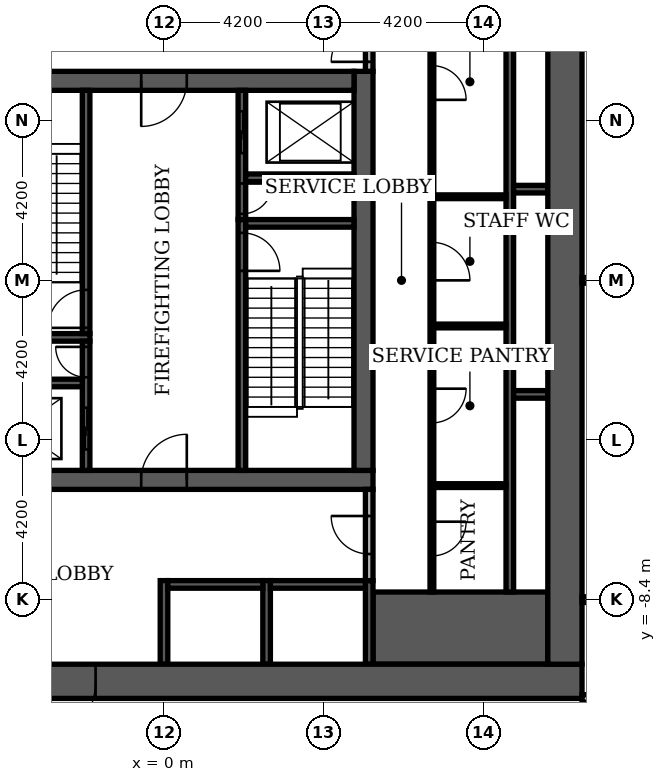
"""IFC4 building model, lengths in metres.
Left out: names, types, materials, properties, quantities, classifications, styles, units other than length and angle.
Written with IfcOpenShell. Run it as: python <this file> out.ifc"""

import sys

from ifc_helpers import new_model, si_unit, direction, frame, frame_2d, origin, place, context, subcontext, project, spatial, rectangle, extrude, element, fill, save


model = new_model("IFC4")
c1 = context("Model", 3, precision=1e-05, world=origin(), true_north=direction((0.0, 1.0)))
c2 = subcontext(c1, "Body", "Model", "MODEL_VIEW")
j1 = project(units=[si_unit("LENGTHUNIT", "METRE"), si_unit("PLANEANGLEUNIT", "RADIAN")], contexts=[c1])
p1 = place(None, origin())
s1 = spatial("IfcSite", under=j1, at=p1, CompositionType="ELEMENT")
p2 = place(p1, origin())
s2 = spatial("IfcBuilding", under=s1, at=p2, CompositionType="ELEMENT")
p3 = place(p2, frame((0.0, 0.0, 7.2)))
s3 = spatial("IfcBuildingStorey", under=s2, at=p3, CompositionType="ELEMENT", Elevation=7.2)
p4 = place(p3, frame((-5.5, -5.25, 0.0), z_axis=(0.0, 0.0, 1.0), x_axis=(1.0, 0.0, 0.0)))
e1 = element("IfcWall", 1, at=p4, inside=s3, PredefinedType="SHEAR", context=c2, shape_type="SweptSolid", body=[
    extrude(rectangle(XDim=11.0, YDim=0.5, at=frame_2d((5.5, 0.0))), origin(), (0.0, 0.0, 1.0), 4.38),
])
p5 = place(p4, frame((4.9, 0.0, 0.0)))
e2 = element("IfcOpeningElement", 2, at=p5, cuts=e1, PredefinedType="OPENING", context=c2, shape_type="SweptSolid", body=[
    extrude(rectangle(XDim=1.2, YDim=2.1, at=frame_2d((0.6, 1.05))), frame((0.0, 0.26, 0.0), z_axis=(0.0, -1.0, 0.0), x_axis=(1.0, 0.0, 0.0)), (0.0, 0.0, 1.0), 0.52),
])
p6 = place(p3, frame((5.25, -5.0, 0.0), z_axis=(0.0, 0.0, 1.0), x_axis=(0.0, 1.0, 0.0)))
e3 = element("IfcWall", 3, at=p6, inside=s3, PredefinedType="SHEAR", context=c2, shape_type="SweptSolid", body=[
    extrude(rectangle(XDim=10.5, YDim=0.5, at=frame_2d((5.25, 0.0))), origin(), (0.0, 0.0, 1.0), 4.38),
])
p7 = place(p3, frame((-5.0, 5.25, 0.0), z_axis=(0.0, 0.0, 1.0), x_axis=(1.0, 0.0, 0.0)))
e4 = element("IfcWall", 4, at=p7, inside=s3, PredefinedType="SHEAR", context=c2, shape_type="SweptSolid", body=[
    extrude(rectangle(XDim=10.0, YDim=0.5, at=frame_2d((5.0, 0.0))), origin(), (0.0, 0.0, 1.0), 4.38),
])
p8 = place(p7, frame((4.4, 0.0, 0.0)))
e5 = element("IfcOpeningElement", 5, at=p8, cuts=e4, PredefinedType="OPENING", context=c2, shape_type="SweptSolid", body=[
    extrude(rectangle(XDim=1.2, YDim=2.1, at=frame_2d((0.6, 1.05))), frame((0.0, 0.26, 0.0), z_axis=(0.0, -1.0, 0.0), x_axis=(1.0, 0.0, 0.0)), (0.0, 0.0, 1.0), 0.52),
])
p9 = place(p3, frame((5.5, -9.15, 0.0), z_axis=(0.0, 0.0, 1.0), x_axis=(1.0, 0.0, 0.0)))
e6 = element("IfcWall", 6, at=p9, inside=s3, PredefinedType="SHEAR", context=c2, shape_type="SweptSolid", body=[
    extrude(rectangle(XDim=4.6, YDim=1.9, at=frame_2d((2.3, 0.0))), origin(), (0.0, 0.0, 1.0), 4.38),
])
p10 = place(p3, frame((2.05, -5.0, 0.0), z_axis=(0.0, 0.0, 1.0), x_axis=(0.0, 1.0, 0.0)))
e7 = element("IfcWall", 7, at=p10, inside=s3, PredefinedType="SHEAR", context=c2, shape_type="SweptSolid", body=[
    extrude(rectangle(XDim=6.6, YDim=0.2, at=frame_2d((3.3, 0.0))), origin(), (0.0, 0.0, 1.0), 4.38),
])
p11 = place(p10, frame((5.25, 0.0, 0.0)))
e8 = element("IfcOpeningElement", 8, at=p11, cuts=e7, PredefinedType="OPENING", context=c2, shape_type="SweptSolid", body=[
    extrude(rectangle(XDim=1.0, YDim=2.1, at=frame_2d((0.5, 1.05))), frame((0.0, 0.11, 0.0), z_axis=(0.0, -1.0, 0.0), x_axis=(1.0, 0.0, 0.0)), (0.0, 0.0, 1.0), 0.22),
])
p12 = place(p3, frame((-5.0, -1.5, 0.0), z_axis=(0.0, 0.0, 1.0), x_axis=(1.0, 0.0, 0.0)))
e9 = element("IfcWall", 9, at=p12, inside=s3, PredefinedType="SHEAR", context=c2, shape_type="SweptSolid", body=[
    extrude(rectangle(XDim=3.05, YDim=0.2, at=frame_2d((1.525, 0.0))), origin(), (0.0, 0.0, 1.0), 4.38),
])
p13 = place(p3, frame((-2.05, -1.4, 0.0), z_axis=(0.0, 0.0, 1.0), x_axis=(0.0, 1.0, 0.0)))
e10 = element("IfcWall", 10, at=p13, inside=s3, PredefinedType="SHEAR", context=c2, shape_type="SweptSolid", body=[
    extrude(rectangle(XDim=6.4, YDim=0.2, at=frame_2d((3.2, 0.0))), origin(), (0.0, 0.0, 1.0), 4.38),
])
p14 = place(p13, frame((0.15, 0.0, 0.0)))
e11 = element("IfcOpeningElement", 11, at=p14, cuts=e10, PredefinedType="OPENING", context=c2, shape_type="SweptSolid", body=[
    extrude(rectangle(XDim=1.0, YDim=2.1, at=frame_2d((0.5, 1.05))), frame((0.0, 0.11, 0.0), z_axis=(0.0, -1.0, 0.0), x_axis=(1.0, 0.0, 0.0)), (0.0, 0.0, 1.0), 0.22),
])
p15 = place(p3, frame((2.15, 1.5, 0.0), z_axis=(0.0, 0.0, 1.0), x_axis=(1.0, 0.0, 0.0)))
e12 = element("IfcWall", 12, at=p15, inside=s3, PredefinedType="SHEAR", context=c2, shape_type="SweptSolid", body=[
    extrude(rectangle(XDim=2.85, YDim=0.2, at=frame_2d((1.425, 0.0))), origin(), (0.0, 0.0, 1.0), 4.38),
])
for number, where, z_axis, x_axis in (
    (13, (0.0, -10.1, 0.0), (0.0, 0.0, 1.0), (0.0, 1.0, 0.0)),
    (14, (2.7, -10.1, 0.0), (0.0, 0.0, 1.0), (0.0, 1.0, 0.0)),
    (15, (5.4, -10.1, 0.0), (0.0, 0.0, 1.0), (0.0, 1.0, 0.0)),
):
    element("IfcWall", number, at=place(p3, frame(where, z_axis=z_axis, x_axis=x_axis)), inside=s3, PredefinedType="SHEAR", context=c2, shape_type="SweptSolid", body=[
        extrude(rectangle(XDim=2.2, YDim=0.2, at=frame_2d((1.1, 0.0))), origin(), (0.0, 0.0, 1.0), 4.38),
    ])
p16 = place(p3, frame((9.1, -8.2, 0.0), z_axis=(0.0, 0.0, 1.0), x_axis=(0.0, 1.0, 0.0)))
e16 = element("IfcWall", 16, at=p16, inside=s3, PredefinedType="SHEAR", context=c2, shape_type="SweptSolid", body=[
    extrude(rectangle(XDim=16.4, YDim=0.2, at=frame_2d((8.2, 0.0))), origin(), (0.0, 0.0, 1.0), 4.38),
])
for number, where, z_axis, x_axis in (
    (17, (0.1, -8.0, 0.0), (0.0, 0.0, 1.0), (1.0, 0.0, 0.0)),
    (18, (2.8, -8.0, 0.0), (0.0, 0.0, 1.0), (1.0, 0.0, 0.0)),
):
    element("IfcWall", number, at=place(p3, frame(where, z_axis=z_axis, x_axis=x_axis)), inside=s3, PredefinedType="SHEAR", context=c2, shape_type="SweptSolid", body=[
        extrude(rectangle(XDim=2.5, YDim=0.2, at=frame_2d((1.25, 0.0))), origin(), (0.0, 0.0, 1.0), 4.38),
    ])
p17 = place(p3, frame((-2.05, -5.0, 0.0), z_axis=(0.0, 0.0, 1.0), x_axis=(0.0, 1.0, 0.0)))
e19 = element("IfcWall", 19, at=p17, inside=s3, PredefinedType="SHEAR", context=c2, shape_type="SweptSolid", body=[
    extrude(rectangle(XDim=3.4, YDim=0.2, at=frame_2d((1.7, 0.0))), origin(), (0.0, 0.0, 1.0), 4.38),
])
p18 = place(p17, frame((0.55, 0.0, 0.0)))
e20 = element("IfcOpeningElement", 20, at=p18, cuts=e19, PredefinedType="OPENING", context=c2, shape_type="SweptSolid", body=[
    extrude(rectangle(XDim=1.1, YDim=2.1, at=frame_2d((0.55, 1.05))), frame((0.0, 0.11, 0.0), z_axis=(0.0, -1.0, 0.0), x_axis=(1.0, 0.0, 0.0)), (0.0, 0.0, 1.0), 0.22),
])
p19 = place(p17, frame((2.45, 0.0, 0.0)))
e21 = element("IfcOpeningElement", 21, at=p19, cuts=e19, PredefinedType="OPENING", context=c2, shape_type="SweptSolid", body=[
    extrude(rectangle(XDim=0.8, YDim=2.1, at=frame_2d((0.4, 1.05))), frame((0.0, 0.11, 0.0), z_axis=(0.0, -1.0, 0.0), x_axis=(1.0, 0.0, 0.0)), (0.0, 0.0, 1.0), 0.22),
])
p20 = place(p3, frame((9.2, -3.0, 0.0), z_axis=(0.0, 0.0, 1.0), x_axis=(1.0, 0.0, 0.0)))
e22 = element("IfcWall", 22, at=p20, inside=s3, PredefinedType="SHEAR", context=c2, shape_type="SweptSolid", body=[
    extrude(rectangle(XDim=0.9, YDim=0.2, at=frame_2d((0.45, 0.0))), origin(), (0.0, 0.0, 1.0), 4.38),
])
p21 = place(p3, frame((-5.0, -2.7, 0.0), z_axis=(0.0, 0.0, 1.0), x_axis=(1.0, 0.0, 0.0)))
e23 = element("IfcWall", 23, at=p21, inside=s3, PredefinedType="SHEAR", context=c2, shape_type="SweptSolid", body=[
    extrude(rectangle(XDim=2.85, YDim=0.2, at=frame_2d((1.425, 0.0))), origin(), (0.0, 0.0, 1.0), 4.38),
])
p22 = place(p3, frame((2.05, 1.6, 0.0), z_axis=(0.0, 0.0, 1.0), x_axis=(0.0, 1.0, 0.0)))
e24 = element("IfcWall", 24, at=p22, inside=s3, PredefinedType="SHEAR", context=c2, shape_type="SweptSolid", body=[
    extrude(rectangle(XDim=3.4, YDim=0.2, at=frame_2d((1.7, 0.0))), origin(), (0.0, 0.0, 1.0), 4.38),
])
p23 = place(p22, frame((1.75, 0.0, 0.0)))
e25 = element("IfcOpeningElement", 25, at=p23, cuts=e24, PredefinedType="OPENING", context=c2, shape_type="SweptSolid", body=[
    extrude(rectangle(XDim=1.1, YDim=2.1, at=frame_2d((0.55, 1.05))), frame((0.0, 0.11, 0.0), z_axis=(0.0, -1.0, 0.0), x_axis=(1.0, 0.0, 0.0)), (0.0, 0.0, 1.0), 0.22),
])
p24 = place(p22, frame((0.15, 0.0, 0.0)))
e26 = element("IfcOpeningElement", 26, at=p24, cuts=e24, PredefinedType="OPENING", context=c2, shape_type="SweptSolid", body=[
    extrude(rectangle(XDim=0.8, YDim=2.1, at=frame_2d((0.4, 1.05))), frame((0.0, 0.11, 0.0), z_axis=(0.0, -1.0, 0.0), x_axis=(1.0, 0.0, 0.0)), (0.0, 0.0, 1.0), 0.22),
])
p25 = place(p3, frame((9.2, 2.4, 0.0), z_axis=(0.0, 0.0, 1.0), x_axis=(1.0, 0.0, 0.0)))
e27 = element("IfcWall", 27, at=p25, inside=s3, PredefinedType="SHEAR", context=c2, shape_type="SweptSolid", body=[
    extrude(rectangle(XDim=0.9, YDim=0.2, at=frame_2d((0.45, 0.0))), origin(), (0.0, 0.0, 1.0), 4.38),
])
p26 = place(p3, frame((2.15, 2.7, 0.0), z_axis=(0.0, 0.0, 1.0), x_axis=(1.0, 0.0, 0.0)))
e28 = element("IfcWall", 28, at=p26, inside=s3, PredefinedType="SHEAR", context=c2, shape_type="SweptSolid", body=[
    extrude(rectangle(XDim=2.85, YDim=0.2, at=frame_2d((1.425, 0.0))), origin(), (0.0, 0.0, 1.0), 4.38),
])
p27 = place(p3, frame((-11.0, -10.55, 0.0), z_axis=(0.0, 0.0, 1.0), x_axis=(1.0, 0.0, 0.0)))
e29 = element("IfcWall", 29, at=p27, inside=s3, PredefinedType="SHEAR", context=c2, shape_type="SweptSolid", body=[
    extrude(rectangle(XDim=22.0, YDim=0.9, at=frame_2d((11.0, 0.0))), origin(), (0.0, 0.0, 1.0), 4.38),
])
p28 = place(p27, frame((7.4, 0.0, 0.0)))
e30 = element("IfcOpeningElement", 30, at=p28, cuts=e29, PredefinedType="OPENING", context=c2, shape_type="SweptSolid", body=[
    extrude(rectangle(XDim=1.8, YDim=2.2, at=frame_2d((0.9, 1.1))), frame((0.0, 0.46, 0.0), z_axis=(0.0, -1.0, 0.0), x_axis=(1.0, 0.0, 0.0)), (0.0, 0.0, 1.0), 0.92),
])
p29 = place(p3, frame((10.55, -10.1, 0.0), z_axis=(0.0, 0.0, 1.0), x_axis=(0.0, 1.0, 0.0)))
e31 = element("IfcWall", 31, at=p29, inside=s3, PredefinedType="SHEAR", context=c2, shape_type="SweptSolid", body=[
    extrude(rectangle(XDim=20.2, YDim=0.9, at=frame_2d((10.1, 0.0))), origin(), (0.0, 0.0, 1.0), 4.38),
])
p30 = place(p3, frame((7.05, -8.2, 0.0), z_axis=(0.0, 0.0, 1.0), x_axis=(0.0, 1.0, 0.0)))
e32 = element("IfcWall", 32, at=p30, inside=s3, PredefinedType="PARTITIONING", context=c2, shape_type="SweptSolid", body=[
    extrude(rectangle(XDim=16.4, YDim=0.1, at=frame_2d((8.2, 0.0))), origin(), (0.0, 0.0, 1.0), 4.38),
])
p31 = place(p30, frame((0.95, 0.0, 0.0)))
e33 = element("IfcOpeningElement", 33, at=p31, cuts=e32, PredefinedType="OPENING", context=c2, shape_type="SweptSolid", body=[
    extrude(rectangle(XDim=0.9, YDim=2.1, at=frame_2d((0.45, 1.05))), frame((0.0, 0.06, 0.0), z_axis=(0.0, -1.0, 0.0), x_axis=(1.0, 0.0, 0.0)), (0.0, 0.0, 1.0), 0.12),
])
p32 = place(p30, frame((4.45, 0.0, 0.0)))
e34 = element("IfcOpeningElement", 34, at=p32, cuts=e32, PredefinedType="OPENING", context=c2, shape_type="SweptSolid", body=[
    extrude(rectangle(XDim=0.9, YDim=2.1, at=frame_2d((0.45, 1.05))), frame((0.0, 0.06, 0.0), z_axis=(0.0, -1.0, 0.0), x_axis=(1.0, 0.0, 0.0)), (0.0, 0.0, 1.0), 0.12),
])
p33 = place(p30, frame((8.2, 0.0, 0.0)))
e35 = element("IfcOpeningElement", 35, at=p33, cuts=e32, PredefinedType="OPENING", context=c2, shape_type="SweptSolid", body=[
    extrude(rectangle(XDim=1.0, YDim=2.1, at=frame_2d((0.5, 1.05))), frame((0.0, 0.06, 0.0), z_axis=(0.0, -1.0, 0.0), x_axis=(1.0, 0.0, 0.0)), (0.0, 0.0, 1.0), 0.12),
])
p34 = place(p30, frame((12.95, 0.0, 0.0)))
e36 = element("IfcOpeningElement", 36, at=p34, cuts=e32, PredefinedType="OPENING", context=c2, shape_type="SweptSolid", body=[
    extrude(rectangle(XDim=0.9, YDim=2.1, at=frame_2d((0.45, 1.05))), frame((0.0, 0.06, 0.0), z_axis=(0.0, -1.0, 0.0), x_axis=(1.0, 0.0, 0.0)), (0.0, 0.0, 1.0), 0.12),
])
p35 = place(p3, frame((5.4, -7.9, 0.0), z_axis=(0.0, 0.0, 1.0), x_axis=(0.0, 1.0, 0.0)))
e37 = element("IfcWall", 37, at=p35, inside=s3, PredefinedType="PARTITIONING", context=c2, shape_type="SweptSolid", body=[
    extrude(rectangle(XDim=2.4, YDim=0.2, at=frame_2d((1.2, 0.0))), origin(), (0.0, 0.0, 1.0), 4.38),
])
p36 = place(p35, frame((0.7, 0.0, 0.0)))
e38 = element("IfcOpeningElement", 38, at=p36, cuts=e37, PredefinedType="OPENING", context=c2, shape_type="SweptSolid", body=[
    extrude(rectangle(XDim=1.0, YDim=2.1, at=frame_2d((0.5, 1.05))), frame((0.0, 0.11, 0.0), z_axis=(0.0, -1.0, 0.0), x_axis=(1.0, 0.0, 0.0)), (0.0, 0.0, 1.0), 0.22),
])
for number, where, z_axis, x_axis in (
    (39, (7.1, -5.4, 0.0), (0.0, 0.0, 1.0), (1.0, 0.0, 0.0)),
    (40, (7.1, -1.2, 0.0), (0.0, 0.0, 1.0), (1.0, 0.0, 0.0)),
    (41, (7.1, 2.2, 0.0), (0.0, 0.0, 1.0), (1.0, 0.0, 0.0)),
):
    element("IfcWall", number, at=place(p3, frame(where, z_axis=z_axis, x_axis=x_axis)), inside=s3, PredefinedType="PARTITIONING", context=c2, shape_type="SweptSolid", body=[
        extrude(rectangle(XDim=1.9, YDim=0.1, at=frame_2d((0.95, 0.0))), origin(), (0.0, 0.0, 1.0), 4.38),
    ])
p37 = place(p3, frame((5.4, 5.5, 0.0), z_axis=(0.0, 0.0, 1.0), x_axis=(0.0, 1.0, 0.0)))
e42 = element("IfcWall", 42, at=p37, inside=s3, PredefinedType="PARTITIONING", context=c2, shape_type="SweptSolid", body=[
    extrude(rectangle(XDim=4.6, YDim=0.2, at=frame_2d((2.3, 0.0))), origin(), (0.0, 0.0, 1.0), 4.38),
])
p38 = place(p37, frame((0.25, 0.0, 0.0)))
e43 = element("IfcOpeningElement", 43, at=p38, cuts=e42, PredefinedType="OPENING", context=c2, shape_type="SweptSolid", body=[
    extrude(rectangle(XDim=1.0, YDim=2.1, at=frame_2d((0.5, 1.05))), frame((0.0, 0.11, 0.0), z_axis=(0.0, -1.0, 0.0), x_axis=(1.0, 0.0, 0.0)), (0.0, 0.0, 1.0), 0.22),
])
p39 = place(p3, frame((11.0, -11.0, 0.0), z_axis=(0.0, 0.0, 1.0), x_axis=(1.0, 0.0, 0.0)))
e44 = element("IfcWall", 44, at=p39, inside=s3, PredefinedType="PARTITIONING", context=c2, shape_type="SweptSolid", body=[
    extrude(rectangle(XDim=14.1, YDim=0.2, at=frame_2d((7.05, 0.0))), origin(), (0.0, 0.0, 1.0), 4.38),
])
p40 = place(p39, frame((6.5, 0.0, 0.0)))
e45 = element("IfcOpeningElement", 45, at=p40, cuts=e44, PredefinedType="OPENING", context=c2, shape_type="SweptSolid", body=[
    extrude(rectangle(XDim=1.2, YDim=2.2, at=frame_2d((0.6, 1.1))), frame((0.0, 0.11, 0.0), z_axis=(0.0, -1.0, 0.0), x_axis=(1.0, 0.0, 0.0)), (0.0, 0.0, 1.0), 0.22),
])
p41 = place(p3, frame((11.0, -8.4, 0.0), z_axis=(0.0, 0.0, 1.0), x_axis=(1.0, 0.0, 0.0)))
e46 = element("IfcWall", 46, at=p41, inside=s3, PredefinedType="PARTITIONING", context=c2, shape_type="SweptSolid", body=[
    extrude(rectangle(XDim=13.6, YDim=0.15, at=frame_2d((6.8, 0.0))), origin(), (0.0, 0.0, 1.0), 4.38),
])
p42 = place(p41, frame((0.5, 0.0, 0.0)))
e47 = element("IfcOpeningElement", 47, at=p42, cuts=e46, PredefinedType="OPENING", context=c2, shape_type="SweptSolid", body=[
    extrude(rectangle(XDim=1.0, YDim=2.1, at=frame_2d((0.5, 1.05))), frame((0.0, 0.085, 0.0), z_axis=(0.0, -1.0, 0.0), x_axis=(1.0, 0.0, 0.0)), (0.0, 0.0, 1.0), 0.17),
])
p43 = place(p41, frame((3.7, 0.0, 0.0)))
e48 = element("IfcOpeningElement", 48, at=p43, cuts=e46, PredefinedType="OPENING", context=c2, shape_type="SweptSolid", body=[
    extrude(rectangle(XDim=1.0, YDim=2.1, at=frame_2d((0.5, 1.05))), frame((0.0, 0.085, 0.0), z_axis=(0.0, -1.0, 0.0), x_axis=(1.0, 0.0, 0.0)), (0.0, 0.0, 1.0), 0.17),
])
p44 = place(p41, frame((8.1, 0.0, 0.0)))
e49 = element("IfcOpeningElement", 49, at=p44, cuts=e46, PredefinedType="OPENING", context=c2, shape_type="SweptSolid", body=[
    extrude(rectangle(XDim=1.0, YDim=2.1, at=frame_2d((0.5, 1.05))), frame((0.0, 0.085, 0.0), z_axis=(0.0, -1.0, 0.0), x_axis=(1.0, 0.0, 0.0)), (0.0, 0.0, 1.0), 0.17),
])
p45 = place(p41, frame((11.3, 0.0, 0.0)))
e50 = element("IfcOpeningElement", 50, at=p45, cuts=e46, PredefinedType="OPENING", context=c2, shape_type="SweptSolid", body=[
    extrude(rectangle(XDim=1.0, YDim=2.1, at=frame_2d((0.5, 1.05))), frame((0.0, 0.085, 0.0), z_axis=(0.0, -1.0, 0.0), x_axis=(1.0, 0.0, 0.0)), (0.0, 0.0, 1.0), 0.17),
])
p46 = place(p3, frame((11.0, 0.0, 0.0), z_axis=(0.0, 0.0, 1.0), x_axis=(1.0, 0.0, 0.0)))
e51 = element("IfcWall", 51, at=p46, inside=s3, PredefinedType="PARTITIONING", context=c2, shape_type="SweptSolid", body=[
    extrude(rectangle(XDim=13.6, YDim=0.15, at=frame_2d((6.8, 0.0))), origin(), (0.0, 0.0, 1.0), 4.38),
])
p47 = place(p23, origin())
e52 = element("IfcDoor", 52, at=p47, inside=s3, OperationType="SLIDING_TO_LEFT", PredefinedType="DOOR", context=c2, shape_type="SweptSolid", body=[
    extrude(rectangle(XDim=1.1, YDim=2.1, at=frame_2d((0.55, 1.05))), frame((0.0, 0.025, 0.0), z_axis=(0.0, -1.0, 0.0), x_axis=(1.0, 0.0, 0.0)), (0.0, 0.0, 1.0), 0.05),
])
fill(e25, e52)
p48 = place(p18, origin())
e53 = element("IfcDoor", 53, at=p48, inside=s3, OperationType="SLIDING_TO_LEFT", PredefinedType="DOOR", context=c2, shape_type="SweptSolid", body=[
    extrude(rectangle(XDim=1.1, YDim=2.1, at=frame_2d((0.55, 1.05))), frame((0.0, 0.025, 0.0), z_axis=(0.0, -1.0, 0.0), x_axis=(1.0, 0.0, 0.0)), (0.0, 0.0, 1.0), 0.05),
])
fill(e20, e53)
p49 = place(p14, origin())
e54 = element("IfcDoor", 54, at=p49, inside=s3, OperationType="SINGLE_SWING_LEFT", PredefinedType="DOOR", context=c2, shape_type="SweptSolid", body=[
    extrude(rectangle(XDim=1.0, YDim=2.1, at=frame_2d((0.5, 1.05))), frame((0.0, 0.025, 0.0), z_axis=(0.0, -1.0, 0.0), x_axis=(1.0, 0.0, 0.0)), (0.0, 0.0, 1.0), 0.05),
])
fill(e11, e54)
p50 = place(p11, frame((1.0, 0.0, 0.0), z_axis=(0.0, 0.0, 1.0), x_axis=(-1.0, 0.0, 0.0)))
e55 = element("IfcDoor", 55, at=p50, inside=s3, OperationType="SINGLE_SWING_LEFT", PredefinedType="DOOR", context=c2, shape_type="SweptSolid", body=[
    extrude(rectangle(XDim=1.0, YDim=2.1, at=frame_2d((0.5, 1.05))), frame((0.0, 0.025, 0.0), z_axis=(0.0, -1.0, 0.0), x_axis=(1.0, 0.0, 0.0)), (0.0, 0.0, 1.0), 0.05),
])
fill(e8, e55)
p51 = place(p24, frame((0.8, 0.0, 0.0), z_axis=(0.0, 0.0, 1.0), x_axis=(-1.0, 0.0, 0.0)))
e56 = element("IfcDoor", 56, at=p51, inside=s3, OperationType="SINGLE_SWING_RIGHT", PredefinedType="DOOR", context=c2, shape_type="SweptSolid", body=[
    extrude(rectangle(XDim=0.8, YDim=2.1, at=frame_2d((0.4, 1.05))), frame((0.0, 0.025, 0.0), z_axis=(0.0, -1.0, 0.0), x_axis=(1.0, 0.0, 0.0)), (0.0, 0.0, 1.0), 0.05),
])
fill(e26, e56)
p52 = place(p19, origin())
e57 = element("IfcDoor", 57, at=p52, inside=s3, OperationType="SINGLE_SWING_RIGHT", PredefinedType="DOOR", context=c2, shape_type="SweptSolid", body=[
    extrude(rectangle(XDim=0.8, YDim=2.1, at=frame_2d((0.4, 1.05))), frame((0.0, 0.025, 0.0), z_axis=(0.0, -1.0, 0.0), x_axis=(1.0, 0.0, 0.0)), (0.0, 0.0, 1.0), 0.05),
])
fill(e21, e57)
p53 = place(p8, frame((1.2, 0.0, 0.0), z_axis=(0.0, 0.0, 1.0), x_axis=(-1.0, 0.0, 0.0)))
e58 = element("IfcDoor", 58, at=p53, inside=s3, OperationType="SINGLE_SWING_LEFT", PredefinedType="DOOR", context=c2, shape_type="SweptSolid", body=[
    extrude(rectangle(XDim=1.2, YDim=2.1, at=frame_2d((0.6, 1.05))), frame((0.0, 0.025, 0.0), z_axis=(0.0, -1.0, 0.0), x_axis=(1.0, 0.0, 0.0)), (0.0, 0.0, 1.0), 0.05),
])
fill(e5, e58)
p54 = place(p5, origin())
e59 = element("IfcDoor", 59, at=p54, inside=s3, OperationType="SINGLE_SWING_RIGHT", PredefinedType="DOOR", context=c2, shape_type="SweptSolid", body=[
    extrude(rectangle(XDim=1.2, YDim=2.1, at=frame_2d((0.6, 1.05))), frame((0.0, 0.025, 0.0), z_axis=(0.0, -1.0, 0.0), x_axis=(1.0, 0.0, 0.0)), (0.0, 0.0, 1.0), 0.05),
])
fill(e2, e59)
p55 = place(p38, origin())
e60 = element("IfcDoor", 60, at=p55, inside=s3, OperationType="SINGLE_SWING_LEFT", PredefinedType="DOOR", context=c2, shape_type="SweptSolid", body=[
    extrude(rectangle(XDim=1.0, YDim=2.1, at=frame_2d((0.5, 1.05))), frame((0.0, 0.025, 0.0), z_axis=(0.0, -1.0, 0.0), x_axis=(1.0, 0.0, 0.0)), (0.0, 0.0, 1.0), 0.05),
])
fill(e43, e60)
p56 = place(p36, origin())
e61 = element("IfcDoor", 61, at=p56, inside=s3, OperationType="SINGLE_SWING_RIGHT", PredefinedType="DOOR", context=c2, shape_type="SweptSolid", body=[
    extrude(rectangle(XDim=1.0, YDim=2.1, at=frame_2d((0.5, 1.05))), frame((0.0, 0.025, 0.0), z_axis=(0.0, -1.0, 0.0), x_axis=(1.0, 0.0, 0.0)), (0.0, 0.0, 1.0), 0.05),
])
fill(e38, e61)
p57 = place(p28, frame((1.8, 0.0, 0.0), z_axis=(0.0, 0.0, 1.0), x_axis=(-1.0, 0.0, 0.0)))
e62 = element("IfcDoor", 62, at=p57, inside=s3, OperationType="DOUBLE_DOOR_SINGLE_SWING", PredefinedType="DOOR", context=c2, shape_type="SweptSolid", body=[
    extrude(rectangle(XDim=1.8, YDim=2.2, at=frame_2d((0.9, 1.1))), frame((0.0, 0.025, 0.0), z_axis=(0.0, -1.0, 0.0), x_axis=(1.0, 0.0, 0.0)), (0.0, 0.0, 1.0), 0.05),
])
fill(e30, e62)
p58 = place(p31, frame((0.9, 0.0, 0.0), z_axis=(0.0, 0.0, 1.0), x_axis=(-1.0, 0.0, 0.0)))
e63 = element("IfcDoor", 63, at=p58, inside=s3, OperationType="SINGLE_SWING_RIGHT", PredefinedType="DOOR", context=c2, shape_type="SweptSolid", body=[
    extrude(rectangle(XDim=0.9, YDim=2.1, at=frame_2d((0.45, 1.05))), frame((0.0, 0.025, 0.0), z_axis=(0.0, -1.0, 0.0), x_axis=(1.0, 0.0, 0.0)), (0.0, 0.0, 1.0), 0.05),
])
fill(e33, e63)
p59 = place(p32, frame((0.9, 0.0, 0.0), z_axis=(0.0, 0.0, 1.0), x_axis=(-1.0, 0.0, 0.0)))
e64 = element("IfcDoor", 64, at=p59, inside=s3, OperationType="SINGLE_SWING_RIGHT", PredefinedType="DOOR", context=c2, shape_type="SweptSolid", body=[
    extrude(rectangle(XDim=0.9, YDim=2.1, at=frame_2d((0.45, 1.05))), frame((0.0, 0.025, 0.0), z_axis=(0.0, -1.0, 0.0), x_axis=(1.0, 0.0, 0.0)), (0.0, 0.0, 1.0), 0.05),
])
fill(e34, e64)
p60 = place(p33, frame((1.0, 0.0, 0.0), z_axis=(0.0, 0.0, 1.0), x_axis=(-1.0, 0.0, 0.0)))
e65 = element("IfcDoor", 65, at=p60, inside=s3, OperationType="SINGLE_SWING_LEFT", PredefinedType="DOOR", context=c2, shape_type="SweptSolid", body=[
    extrude(rectangle(XDim=1.0, YDim=2.1, at=frame_2d((0.5, 1.05))), frame((0.0, 0.025, 0.0), z_axis=(0.0, -1.0, 0.0), x_axis=(1.0, 0.0, 0.0)), (0.0, 0.0, 1.0), 0.05),
])
fill(e35, e65)
p61 = place(p34, frame((0.9, 0.0, 0.0), z_axis=(0.0, 0.0, 1.0), x_axis=(-1.0, 0.0, 0.0)))
e66 = element("IfcDoor", 66, at=p61, inside=s3, OperationType="SINGLE_SWING_LEFT", PredefinedType="DOOR", context=c2, shape_type="SweptSolid", body=[
    extrude(rectangle(XDim=0.9, YDim=2.1, at=frame_2d((0.45, 1.05))), frame((0.0, 0.025, 0.0), z_axis=(0.0, -1.0, 0.0), x_axis=(1.0, 0.0, 0.0)), (0.0, 0.0, 1.0), 0.05),
])
fill(e36, e66)
save(model, sys.argv[1])
